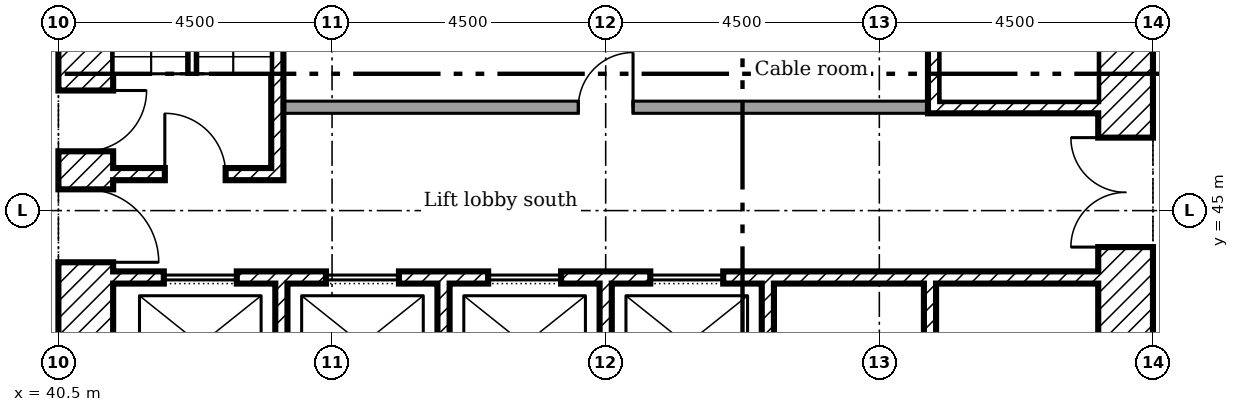
"""IFC4 building model, lengths in metres.
Left out: names, types, materials, properties, quantities, classifications, styles, units other than length and angle.
Written with IfcOpenShell. Run it as: python <this file> out.ifc"""

import sys

from ifc_helpers import new_model, si_unit, direction, frame, frame_2d, origin, place, context, subcontext, project, spatial, rectangle, extrude, element, fill, save


model = new_model("IFC4")
c1 = context("Model", 3, precision=1e-05, world=origin(), true_north=direction((0.0, 1.0)))
c2 = subcontext(c1, "Body", "Model", "MODEL_VIEW")
j1 = project(units=[si_unit("LENGTHUNIT", "METRE"), si_unit("PLANEANGLEUNIT", "RADIAN")], contexts=[c1])
p1 = place(None, origin())
s1 = spatial("IfcSite", under=j1, at=p1, CompositionType="ELEMENT")
p2 = place(p1, origin())
s2 = spatial("IfcBuilding", under=s1, at=p2, CompositionType="ELEMENT")
p3 = place(p2, frame((0.0, 0.0, 38.6)))
s3 = spatial("IfcBuildingStorey", under=s2, at=p3, CompositionType="ELEMENT", Elevation=38.6)
p4 = place(p3, frame((58.05, 40.5, 0.0), z_axis=(0.0, 0.0, 1.0), x_axis=(0.0, 1.0, 0.0)))
e1 = element("IfcWall", 1, at=p4, inside=s3, PredefinedType="SHEAR", context=c2, shape_type="SweptSolid", body=[
    extrude(rectangle(XDim=18.0, YDim=0.9, at=frame_2d((9.0, 0.0))), origin(), (0.0, 0.0, 1.0), 4.125),
])
p5 = place(p4, frame((13.15, 0.0, 0.0)))
e2 = element("IfcOpeningElement", 2, at=p5, cuts=e1, PredefinedType="OPENING", context=c2, shape_type="SweptSolid", body=[
    extrude(rectangle(XDim=1.2, YDim=2.1, at=frame_2d((0.6, 1.05))), frame((0.0, 0.46, 0.0), z_axis=(0.0, -1.0, 0.0), x_axis=(1.0, 0.0, 0.0)), (0.0, 0.0, 1.0), 0.92),
])
p6 = place(p4, frame((3.9, 0.0, 0.0)))
e3 = element("IfcOpeningElement", 3, at=p6, cuts=e1, PredefinedType="OPENING", context=c2, shape_type="SweptSolid", body=[
    extrude(rectangle(XDim=1.8, YDim=2.1, at=frame_2d((0.9, 1.05))), frame((0.0, 0.46, 0.0), z_axis=(0.0, -1.0, 0.0), x_axis=(1.0, 0.0, 0.0)), (0.0, 0.0, 1.0), 0.92),
])
p7 = place(p4, frame((11.525, 0.0, 0.0)))
e4 = element("IfcOpeningElement", 4, at=p7, cuts=e1, PredefinedType="OPENING", context=c2, shape_type="SweptSolid", body=[
    extrude(rectangle(XDim=1.0, YDim=2.1, at=frame_2d((0.5, 1.05))), frame((0.0, 0.46, 0.0), z_axis=(0.0, -1.0, 0.0), x_axis=(1.0, 0.0, 0.0)), (0.0, 0.0, 1.0), 0.92),
])
p8 = place(p3, frame((40.95, 40.5, 0.0), z_axis=(0.0, 0.0, 1.0), x_axis=(0.0, 1.0, 0.0)))
e5 = element("IfcWall", 5, at=p8, inside=s3, PredefinedType="SHEAR", context=c2, shape_type="SweptSolid", body=[
    extrude(rectangle(XDim=18.0, YDim=0.9, at=frame_2d((9.0, 0.0))), origin(), (0.0, 0.0, 1.0), 4.125),
])
p9 = place(p8, frame((3.65, 0.0, 0.0)))
e6 = element("IfcOpeningElement", 6, at=p9, cuts=e5, PredefinedType="OPENING", context=c2, shape_type="SweptSolid", body=[
    extrude(rectangle(XDim=1.2, YDim=2.1, at=frame_2d((0.6, 1.05))), frame((0.0, 0.46, 0.0), z_axis=(0.0, -1.0, 0.0), x_axis=(1.0, 0.0, 0.0)), (0.0, 0.0, 1.0), 0.92),
])
p10 = place(p8, frame((5.475, 0.0, 0.0)))
e7 = element("IfcOpeningElement", 7, at=p10, cuts=e5, PredefinedType="OPENING", context=c2, shape_type="SweptSolid", body=[
    extrude(rectangle(XDim=1.0, YDim=2.1, at=frame_2d((0.5, 1.05))), frame((0.0, 0.46, 0.0), z_axis=(0.0, -1.0, 0.0), x_axis=(1.0, 0.0, 0.0)), (0.0, 0.0, 1.0), 0.92),
])
p11 = place(p8, frame((12.3, 0.0, 0.0)))
e8 = element("IfcOpeningElement", 8, at=p11, cuts=e5, PredefinedType="OPENING", context=c2, shape_type="SweptSolid", body=[
    extrude(rectangle(XDim=1.0, YDim=2.1, at=frame_2d((0.5, 1.05))), frame((0.0, 0.46, 0.0), z_axis=(0.0, -1.0, 0.0), x_axis=(1.0, 0.0, 0.0)), (0.0, 0.0, 1.0), 0.92),
])
for number, where, z_axis, x_axis in (
    (9, (44.167, 41.4, 0.0), (0.0, 0.0, 1.0), (0.0, 1.0, 0.0)),
    (10, (46.833, 41.4, 0.0), (0.0, 0.0, 1.0), (0.0, 1.0, 0.0)),
    (11, (49.5, 41.4, 0.0), (0.0, 0.0, 1.0), (0.0, 1.0, 0.0)),
    (12, (52.167, 41.4, 0.0), (0.0, 0.0, 1.0), (0.0, 1.0, 0.0)),
    (13, (54.833, 41.4, 0.0), (0.0, 0.0, 1.0), (0.0, 1.0, 0.0)),
):
    element("IfcWall", number, at=place(p3, frame(where, z_axis=z_axis, x_axis=x_axis)), inside=s3, PredefinedType="SHEAR", context=c2, shape_type="SweptSolid", body=[
        extrude(rectangle(XDim=2.4, YDim=0.2, at=frame_2d((1.2, 0.0))), origin(), (0.0, 0.0, 1.0), 4.125),
    ])
p12 = place(p3, frame((41.4, 43.9, 0.0)))
e14 = element("IfcWall", 14, at=p12, inside=s3, PredefinedType="SHEAR", context=c2, shape_type="SweptSolid", body=[
    extrude(rectangle(XDim=16.2, YDim=0.2, at=frame_2d((8.1, 0.0))), origin(), (0.0, 0.0, 1.0), 4.125),
])
p13 = place(p12, frame((0.833, 0.0, 0.0)))
e15 = element("IfcOpeningElement", 15, at=p13, cuts=e14, PredefinedType="OPENING", context=c2, shape_type="SweptSolid", body=[
    extrude(rectangle(XDim=1.2, YDim=2.1, at=frame_2d((0.6, 1.05))), frame((0.0, 0.11, 0.0), z_axis=(0.0, -1.0, 0.0), x_axis=(1.0, 0.0, 0.0)), (0.0, 0.0, 1.0), 0.22),
])
p14 = place(p12, frame((3.5, 0.0, 0.0)))
e16 = element("IfcOpeningElement", 16, at=p14, cuts=e14, PredefinedType="OPENING", context=c2, shape_type="SweptSolid", body=[
    extrude(rectangle(XDim=1.2, YDim=2.1, at=frame_2d((0.6, 1.05))), frame((0.0, 0.11, 0.0), z_axis=(0.0, -1.0, 0.0), x_axis=(1.0, 0.0, 0.0)), (0.0, 0.0, 1.0), 0.22),
])
p15 = place(p12, frame((6.167, 0.0, 0.0)))
e17 = element("IfcOpeningElement", 17, at=p15, cuts=e14, PredefinedType="OPENING", context=c2, shape_type="SweptSolid", body=[
    extrude(rectangle(XDim=1.2, YDim=2.1, at=frame_2d((0.6, 1.05))), frame((0.0, 0.11, 0.0), z_axis=(0.0, -1.0, 0.0), x_axis=(1.0, 0.0, 0.0)), (0.0, 0.0, 1.0), 0.22),
])
p16 = place(p12, frame((8.833, 0.0, 0.0)))
e18 = element("IfcOpeningElement", 18, at=p16, cuts=e14, PredefinedType="OPENING", context=c2, shape_type="SweptSolid", body=[
    extrude(rectangle(XDim=1.2, YDim=2.1, at=frame_2d((0.6, 1.05))), frame((0.0, 0.11, 0.0), z_axis=(0.0, -1.0, 0.0), x_axis=(1.0, 0.0, 0.0)), (0.0, 0.0, 1.0), 0.22),
])
p17 = place(p3, frame((44.1, 45.5, 0.0), z_axis=(0.0, 0.0, 1.0), x_axis=(0.0, 1.0, 0.0)))
e19 = element("IfcWall", 19, at=p17, inside=s3, PredefinedType="SHEAR", context=c2, shape_type="SweptSolid", body=[
    extrude(rectangle(XDim=6.9, YDim=0.2, at=frame_2d((3.45, 0.0))), origin(), (0.0, 0.0, 1.0), 4.125),
])
p18 = place(p3, frame((41.4, 45.6, 0.0)))
e20 = element("IfcWall", 20, at=p18, inside=s3, PredefinedType="SHEAR", context=c2, shape_type="SweptSolid", body=[
    extrude(rectangle(XDim=2.6, YDim=0.2, at=frame_2d((1.3, 0.0))), origin(), (0.0, 0.0, 1.0), 4.125),
])
p19 = place(p18, frame((0.85, 0.0, 0.0)))
e21 = element("IfcOpeningElement", 21, at=p19, cuts=e20, PredefinedType="OPENING", context=c2, shape_type="SweptSolid", body=[
    extrude(rectangle(XDim=1.0, YDim=2.1, at=frame_2d((0.5, 1.05))), frame((0.0, 0.11, 0.0), z_axis=(0.0, -1.0, 0.0), x_axis=(1.0, 0.0, 0.0)), (0.0, 0.0, 1.0), 0.22),
])
p20 = place(p3, frame((54.8, 46.7, 0.0)))
e22 = element("IfcWall", 22, at=p20, inside=s3, PredefinedType="SHEAR", context=c2, shape_type="SweptSolid", body=[
    extrude(rectangle(XDim=2.8, YDim=0.2, at=frame_2d((1.4, 0.0))), origin(), (0.0, 0.0, 1.0), 4.125),
])
p21 = place(p3, frame((54.9, 46.8, 0.0), z_axis=(0.0, 0.0, 1.0), x_axis=(0.0, 1.0, 0.0)))
e23 = element("IfcWall", 23, at=p21, inside=s3, PredefinedType="SHEAR", context=c2, shape_type="SweptSolid", body=[
    extrude(rectangle(XDim=6.5, YDim=0.2, at=frame_2d((3.25, 0.0))), origin(), (0.0, 0.0, 1.0), 4.125),
])
p22 = place(p3, frame((44.2, 46.7, 0.0)))
e24 = element("IfcWall", 24, at=p22, inside=s3, PredefinedType="PARTITIONING", context=c2, shape_type="SweptSolid", body=[
    extrude(rectangle(XDim=10.6, YDim=0.2, at=frame_2d((5.3, 0.0))), origin(), (0.0, 0.0, 1.0), 4.125),
])
p23 = place(p22, frame((4.85, 0.0, 0.0)))
e25 = element("IfcOpeningElement", 25, at=p23, cuts=e24, PredefinedType="OPENING", context=c2, shape_type="SweptSolid", body=[
    extrude(rectangle(XDim=0.9, YDim=2.1, at=frame_2d((0.45, 1.05))), frame((0.0, 0.11, 0.0), z_axis=(0.0, -1.0, 0.0), x_axis=(1.0, 0.0, 0.0)), (0.0, 0.0, 1.0), 0.22),
])
p24 = place(p6, origin())
e26 = element("IfcDoor", 26, at=p24, inside=s3, OperationType="DOUBLE_DOOR_SINGLE_SWING", PredefinedType="DOOR", context=c2, shape_type="SweptSolid", body=[
    extrude(rectangle(XDim=1.8, YDim=2.1, at=frame_2d((0.9, 1.05))), frame((0.0, 0.025, 0.0), z_axis=(0.0, -1.0, 0.0), x_axis=(1.0, 0.0, 0.0)), (0.0, 0.0, 1.0), 0.05),
])
fill(e3, e26)
p25 = place(p9, frame((1.2, 0.0, 0.0), x_axis=(-1.0, 0.0, 0.0)))
e27 = element("IfcDoor", 27, at=p25, inside=s3, OperationType="SINGLE_SWING_LEFT", PredefinedType="DOOR", context=c2, shape_type="SweptSolid", body=[
    extrude(rectangle(XDim=1.2, YDim=2.1, at=frame_2d((0.6, 1.05))), frame((0.0, 0.025, 0.0), z_axis=(0.0, -1.0, 0.0), x_axis=(1.0, 0.0, 0.0)), (0.0, 0.0, 1.0), 0.05),
])
fill(e6, e27)
p26 = place(p19, origin())
e28 = element("IfcDoor", 28, at=p26, inside=s3, OperationType="SINGLE_SWING_RIGHT", PredefinedType="DOOR", context=c2, shape_type="SweptSolid", body=[
    extrude(rectangle(XDim=1.0, YDim=2.1, at=frame_2d((0.5, 1.05))), frame((0.0, 0.025, 0.0), z_axis=(0.0, -1.0, 0.0), x_axis=(1.0, 0.0, 0.0)), (0.0, 0.0, 1.0), 0.05),
])
fill(e21, e28)
p27 = place(p10, frame((1.0, 0.0, 0.0), x_axis=(-1.0, 0.0, 0.0)))
e29 = element("IfcDoor", 29, at=p27, inside=s3, OperationType="SINGLE_SWING_RIGHT", PredefinedType="DOOR", context=c2, shape_type="SweptSolid", body=[
    extrude(rectangle(XDim=1.0, YDim=2.1, at=frame_2d((0.5, 1.05))), frame((0.0, 0.025, 0.0), z_axis=(0.0, -1.0, 0.0), x_axis=(1.0, 0.0, 0.0)), (0.0, 0.0, 1.0), 0.05),
])
fill(e7, e29)
p28 = place(p23, origin())
e30 = element("IfcDoor", 30, at=p28, inside=s3, OperationType="SINGLE_SWING_LEFT", PredefinedType="DOOR", context=c2, shape_type="SweptSolid", body=[
    extrude(rectangle(XDim=0.9, YDim=2.1, at=frame_2d((0.45, 1.05))), frame((0.0, 0.025, 0.0), z_axis=(0.0, -1.0, 0.0), x_axis=(1.0, 0.0, 0.0)), (0.0, 0.0, 1.0), 0.05),
])
fill(e25, e30)
p29 = place(p13, origin())
e31 = element("IfcDoor", 31, at=p29, inside=s3, OperationType="SLIDING_TO_LEFT", PredefinedType="DOOR", context=c2, shape_type="SweptSolid", body=[
    extrude(rectangle(XDim=1.2, YDim=2.1, at=frame_2d((0.6, 1.05))), frame((0.0, 0.025, 0.0), z_axis=(0.0, -1.0, 0.0), x_axis=(1.0, 0.0, 0.0)), (0.0, 0.0, 1.0), 0.05),
])
fill(e15, e31)
p30 = place(p14, origin())
e32 = element("IfcDoor", 32, at=p30, inside=s3, OperationType="SLIDING_TO_LEFT", PredefinedType="DOOR", context=c2, shape_type="SweptSolid", body=[
    extrude(rectangle(XDim=1.2, YDim=2.1, at=frame_2d((0.6, 1.05))), frame((0.0, 0.025, 0.0), z_axis=(0.0, -1.0, 0.0), x_axis=(1.0, 0.0, 0.0)), (0.0, 0.0, 1.0), 0.05),
])
fill(e16, e32)
p31 = place(p15, origin())
e33 = element("IfcDoor", 33, at=p31, inside=s3, OperationType="SLIDING_TO_LEFT", PredefinedType="DOOR", context=c2, shape_type="SweptSolid", body=[
    extrude(rectangle(XDim=1.2, YDim=2.1, at=frame_2d((0.6, 1.05))), frame((0.0, 0.025, 0.0), z_axis=(0.0, -1.0, 0.0), x_axis=(1.0, 0.0, 0.0)), (0.0, 0.0, 1.0), 0.05),
])
fill(e17, e33)
p32 = place(p16, origin())
e34 = element("IfcDoor", 34, at=p32, inside=s3, OperationType="SLIDING_TO_LEFT", PredefinedType="DOOR", context=c2, shape_type="SweptSolid", body=[
    extrude(rectangle(XDim=1.2, YDim=2.1, at=frame_2d((0.6, 1.05))), frame((0.0, 0.025, 0.0), z_axis=(0.0, -1.0, 0.0), x_axis=(1.0, 0.0, 0.0)), (0.0, 0.0, 1.0), 0.05),
])
fill(e18, e34)
save(model, sys.argv[1])
